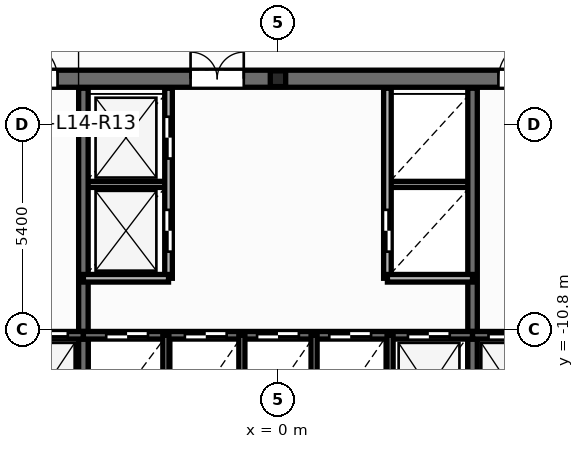
"""IFC4 building model, lengths in metres.
Left out: names, types, materials, properties, quantities, classifications, styles, units other than length and angle.
Written with IfcOpenShell. Run it as: python <this file> out.ifc"""

import sys

from ifc_helpers import new_model, si_unit, direction, frame, frame_2d, origin, origin_2d, place, context, subcontext, project, spatial, rectangle, i_section, extrude, element, fill, save


model = new_model("IFC4")
c1 = context("Model", 3, precision=1e-05, world=origin(), true_north=direction((0.0, 1.0)))
c2 = subcontext(c1, "Body", "Model", "MODEL_VIEW")
j1 = project(units=[si_unit("LENGTHUNIT", "METRE"), si_unit("PLANEANGLEUNIT", "RADIAN")], contexts=[c1])
p1 = place(None, origin())
s1 = spatial("IfcSite", under=j1, at=p1, CompositionType="ELEMENT")
p2 = place(p1, origin())
s2 = spatial("IfcBuilding", under=s1, at=p2, CompositionType="ELEMENT")
p3 = place(p2, frame((0.0, 0.0, 56.7)))
s3 = spatial("IfcBuildingStorey", under=s2, at=p3, CompositionType="ELEMENT", Elevation=56.7)
p4 = place(p3, frame((0.0, -4.2, 0.0), z_axis=(0.0, 0.0, 1.0), x_axis=(1.0, 0.0, 0.0)))
e1 = element("IfcColumn", 1, at=p4, inside=s3, PredefinedType="PILASTER", context=c2, shape_type="SweptSolid", body=[
    extrude(i_section(OverallWidth=0.405, OverallDepth=0.414, WebThickness=0.022, FlangeThickness=0.032, at=origin_2d()), origin(), (0.0, 0.0, 1.0), 3.6),
])
for number, where, z_axis, x_axis in (
    (2, (-5.12, -6.98, 0.0), (0.0, 0.0, 1.0), (1.0, 0.0, 0.0)),
    (3, (2.88, -6.98, 0.0), (0.0, 0.0, 1.0), (1.0, 0.0, 0.0)),
):
    element("IfcWall", number, at=place(p3, frame(where, z_axis=z_axis, x_axis=x_axis)), inside=s3, PredefinedType="PARTITIONING", context=c2, shape_type="SweptSolid", body=[
        extrude(rectangle(XDim=2.24, YDim=0.16, at=frame_2d((1.12, 0.0))), origin(), (0.0, 0.0, 1.0), 3.32),
    ])
p5 = place(p3, frame((-12.65, -4.2, 0.0), z_axis=(0.0, 0.0, 1.0), x_axis=(1.0, 0.0, 0.0)))
e4 = element("IfcWall", 4, at=p5, inside=s3, PredefinedType="SHEAR", context=c2, shape_type="SweptSolid", body=[
    extrude(rectangle(XDim=25.3, YDim=0.45, at=frame_2d((12.65, 0.0))), origin(), (0.0, 0.0, 1.0), 3.6),
])
p6 = place(p5, frame((0.95, 0.0, 0.0)))
e5 = element("IfcOpeningElement", 5, at=p6, cuts=e4, PredefinedType="OPENING", context=c2, shape_type="SweptSolid", body=[
    extrude(rectangle(XDim=0.756, YDim=2.054, at=frame_2d((0.375, 1.027))), frame((0.0, 0.235, 0.0), z_axis=(0.0, -1.0, 0.0), x_axis=(1.0, 0.0, 0.0)), (0.0, 0.0, 1.0), 0.47),
])
p7 = place(p5, frame((2.6, 0.0, 0.0)))
e6 = element("IfcOpeningElement", 6, at=p7, cuts=e4, PredefinedType="OPENING", context=c2, shape_type="SweptSolid", body=[
    extrude(rectangle(XDim=0.756, YDim=2.054, at=frame_2d((0.375, 1.027))), frame((0.0, 0.235, 0.0), z_axis=(0.0, -1.0, 0.0), x_axis=(1.0, 0.0, 0.0)), (0.0, 0.0, 1.0), 0.47),
])
p8 = place(p5, frame((21.85, 0.0, 0.0)))
e7 = element("IfcOpeningElement", 7, at=p8, cuts=e4, PredefinedType="OPENING", context=c2, shape_type="SweptSolid", body=[
    extrude(rectangle(XDim=0.756, YDim=2.054, at=frame_2d((0.375, 1.027))), frame((0.0, 0.235, 0.0), z_axis=(0.0, -1.0, 0.0), x_axis=(1.0, 0.0, 0.0)), (0.0, 0.0, 1.0), 0.47),
])
p9 = place(p5, frame((23.5, 0.0, 0.0)))
e8 = element("IfcOpeningElement", 8, at=p9, cuts=e4, PredefinedType="OPENING", context=c2, shape_type="SweptSolid", body=[
    extrude(rectangle(XDim=0.756, YDim=2.054, at=frame_2d((0.375, 1.027))), frame((0.0, 0.235, 0.0), z_axis=(0.0, -1.0, 0.0), x_axis=(1.0, 0.0, 0.0)), (0.0, 0.0, 1.0), 0.47),
])
p10 = place(p5, frame((5.85, 0.0, 0.0)))
e9 = element("IfcOpeningElement", 9, at=p10, cuts=e4, PredefinedType="OPENING", context=c2, shape_type="SweptSolid", body=[
    extrude(rectangle(XDim=1.006, YDim=2.104, at=frame_2d((0.5, 1.052))), frame((0.0, 0.235, 0.0), z_axis=(0.0, -1.0, 0.0), x_axis=(1.0, 0.0, 0.0)), (0.0, 0.0, 1.0), 0.47),
])
p11 = place(p5, frame((10.35, 0.0, 0.0)))
e10 = element("IfcOpeningElement", 10, at=p11, cuts=e4, PredefinedType="OPENING", context=c2, shape_type="SweptSolid", body=[
    extrude(rectangle(XDim=1.406, YDim=2.154, at=frame_2d((0.7, 1.077))), frame((0.0, 0.235, 0.0), z_axis=(0.0, -1.0, 0.0), x_axis=(1.0, 0.0, 0.0)), (0.0, 0.0, 1.0), 0.47),
])
p12 = place(p5, frame((18.45, 0.0, 0.0)))
e11 = element("IfcOpeningElement", 11, at=p12, cuts=e4, PredefinedType="OPENING", context=c2, shape_type="SweptSolid", body=[
    extrude(rectangle(XDim=1.006, YDim=2.104, at=frame_2d((0.5, 1.052))), frame((0.0, 0.235, 0.0), z_axis=(0.0, -1.0, 0.0), x_axis=(1.0, 0.0, 0.0)), (0.0, 0.0, 1.0), 0.47),
])
for number, where, z_axis, x_axis in (
    (12, (-5.12, -13.85, 0.0), (0.0, 0.0, 1.0), (0.0, 1.0, 0.0)),
    (13, (5.12, -13.85, 0.0), (0.0, 0.0, 1.0), (0.0, 1.0, 0.0)),
):
    element("IfcWall", number, at=place(p3, frame(where, z_axis=z_axis, x_axis=x_axis)), inside=s3, PredefinedType="SHEAR", context=c2, shape_type="SweptSolid", body=[
        extrude(rectangle(XDim=9.4, YDim=0.25, at=frame_2d((4.7, 0.0))), origin(), (0.0, 0.0, 1.0), 3.6),
    ])
p13 = place(p3, frame((-8.48, -10.95, 0.0), z_axis=(0.0, 0.0, 1.0), x_axis=(1.0, 0.0, 0.0)))
e14 = element("IfcWall", 14, at=p13, inside=s3, PredefinedType="SOLIDWALL", context=c2, shape_type="SweptSolid", body=[
    extrude(rectangle(XDim=3.36, YDim=0.2, at=frame_2d((1.68, 0.0))), origin(), (0.0, 0.0, 1.0), 3.6),
])
p14 = place(p13, frame((0.28, 0.0, 0.0)))
e15 = element("IfcOpeningElement", 15, at=p14, cuts=e14, PredefinedType="OPENING", context=c2, shape_type="SweptSolid", body=[
    extrude(rectangle(XDim=0.756, YDim=2.054, at=frame_2d((0.375, 1.027))), frame((0.0, 0.11, 0.0), z_axis=(0.0, -1.0, 0.0), x_axis=(1.0, 0.0, 0.0)), (0.0, 0.0, 1.0), 0.22),
])
p15 = place(p13, frame((1.85, 0.0, 0.0)))
e16 = element("IfcOpeningElement", 16, at=p15, cuts=e14, PredefinedType="OPENING", context=c2, shape_type="SweptSolid", body=[
    extrude(rectangle(XDim=1.106, YDim=2.104, at=frame_2d((0.55, 1.052))), frame((0.0, 0.11, 0.0), z_axis=(0.0, -1.0, 0.0), x_axis=(1.0, 0.0, 0.0)), (0.0, 0.0, 1.0), 0.22),
])
p16 = place(p3, frame((-5.12, -10.95, 0.0), z_axis=(0.0, 0.0, 1.0), x_axis=(1.0, 0.0, 0.0)))
e17 = element("IfcWall", 17, at=p16, inside=s3, PredefinedType="SOLIDWALL", context=c2, shape_type="SweptSolid", body=[
    extrude(rectangle(XDim=10.24, YDim=0.2, at=frame_2d((5.12, 0.0))), origin(), (0.0, 0.0, 1.0), 3.6),
])
p17 = place(p16, frame((0.6, 0.0, 0.0)))
e18 = element("IfcOpeningElement", 18, at=p17, cuts=e17, PredefinedType="OPENING", context=c2, shape_type="SweptSolid", body=[
    extrude(rectangle(XDim=1.106, YDim=2.104, at=frame_2d((0.55, 1.052))), frame((0.0, 0.11, 0.0), z_axis=(0.0, -1.0, 0.0), x_axis=(1.0, 0.0, 0.0)), (0.0, 0.0, 1.0), 0.22),
])
p18 = place(p16, frame((2.67, 0.0, 0.0)))
e19 = element("IfcOpeningElement", 19, at=p18, cuts=e17, PredefinedType="OPENING", context=c2, shape_type="SweptSolid", body=[
    extrude(rectangle(XDim=1.106, YDim=2.104, at=frame_2d((0.55, 1.052))), frame((0.0, 0.11, 0.0), z_axis=(0.0, -1.0, 0.0), x_axis=(1.0, 0.0, 0.0)), (0.0, 0.0, 1.0), 0.22),
])
p19 = place(p16, frame((4.57, 0.0, 0.0)))
e20 = element("IfcOpeningElement", 20, at=p19, cuts=e17, PredefinedType="OPENING", context=c2, shape_type="SweptSolid", body=[
    extrude(rectangle(XDim=1.106, YDim=2.104, at=frame_2d((0.55, 1.052))), frame((0.0, 0.11, 0.0), z_axis=(0.0, -1.0, 0.0), x_axis=(1.0, 0.0, 0.0)), (0.0, 0.0, 1.0), 0.22),
])
p20 = place(p16, frame((6.47, 0.0, 0.0)))
e21 = element("IfcOpeningElement", 21, at=p20, cuts=e17, PredefinedType="OPENING", context=c2, shape_type="SweptSolid", body=[
    extrude(rectangle(XDim=1.106, YDim=2.104, at=frame_2d((0.55, 1.052))), frame((0.0, 0.11, 0.0), z_axis=(0.0, -1.0, 0.0), x_axis=(1.0, 0.0, 0.0)), (0.0, 0.0, 1.0), 0.22),
])
p21 = place(p16, frame((8.54, 0.0, 0.0)))
e22 = element("IfcOpeningElement", 22, at=p21, cuts=e17, PredefinedType="OPENING", context=c2, shape_type="SweptSolid", body=[
    extrude(rectangle(XDim=1.106, YDim=2.104, at=frame_2d((0.55, 1.052))), frame((0.0, 0.11, 0.0), z_axis=(0.0, -1.0, 0.0), x_axis=(1.0, 0.0, 0.0)), (0.0, 0.0, 1.0), 0.22),
])
p22 = place(p3, frame((5.12, -10.95, 0.0), z_axis=(0.0, 0.0, 1.0), x_axis=(1.0, 0.0, 0.0)))
e23 = element("IfcWall", 23, at=p22, inside=s3, PredefinedType="SOLIDWALL", context=c2, shape_type="SweptSolid", body=[
    extrude(rectangle(XDim=3.36, YDim=0.2, at=frame_2d((1.68, 0.0))), origin(), (0.0, 0.0, 1.0), 3.6),
])
p23 = place(p22, frame((0.42, 0.0, 0.0)))
e24 = element("IfcOpeningElement", 24, at=p23, cuts=e23, PredefinedType="OPENING", context=c2, shape_type="SweptSolid", body=[
    extrude(rectangle(XDim=1.106, YDim=2.104, at=frame_2d((0.55, 1.052))), frame((0.0, 0.11, 0.0), z_axis=(0.0, -1.0, 0.0), x_axis=(1.0, 0.0, 0.0)), (0.0, 0.0, 1.0), 0.22),
])
p24 = place(p22, frame((2.3, 0.0, 0.0)))
e25 = element("IfcOpeningElement", 25, at=p24, cuts=e23, PredefinedType="OPENING", context=c2, shape_type="SweptSolid", body=[
    extrude(rectangle(XDim=0.756, YDim=2.054, at=frame_2d((0.375, 1.027))), frame((0.0, 0.11, 0.0), z_axis=(0.0, -1.0, 0.0), x_axis=(1.0, 0.0, 0.0)), (0.0, 0.0, 1.0), 0.22),
])
for number, where, z_axis, x_axis in (
    (26, (-2.95, -13.85, 0.0), (0.0, 0.0, 1.0), (0.0, 1.0, 0.0)),
    (27, (2.95, -13.85, 0.0), (0.0, 0.0, 1.0), (0.0, 1.0, 0.0)),
):
    element("IfcWall", number, at=place(p3, frame(where, z_axis=z_axis, x_axis=x_axis)), inside=s3, PredefinedType="PARTITIONING", context=c2, shape_type="SweptSolid", body=[
        extrude(rectangle(XDim=2.9, YDim=0.16, at=frame_2d((1.45, 0.0))), origin(), (0.0, 0.0, 1.0), 2.345),
    ])
p25 = place(p3, frame((-2.88, -9.45, 0.0), z_axis=(0.0, 0.0, 1.0), x_axis=(0.0, 1.0, 0.0)))
e28 = element("IfcWall", 28, at=p25, inside=s3, PredefinedType="SOLIDWALL", context=c2, shape_type="SweptSolid", body=[
    extrude(rectangle(XDim=5.0, YDim=0.2, at=frame_2d((2.5, 0.0))), origin(), (0.0, 0.0, 1.0), 3.32),
])
p26 = place(p25, frame((0.7, 0.0, 0.0)))
e29 = element("IfcOpeningElement", 29, at=p26, cuts=e28, PredefinedType="OPENING", context=c2, shape_type="SweptSolid", body=[
    extrude(rectangle(XDim=1.106, YDim=2.104, at=frame_2d((0.55, 1.052))), frame((0.0, 0.11, 0.0), z_axis=(0.0, -1.0, 0.0), x_axis=(1.0, 0.0, 0.0)), (0.0, 0.0, 1.0), 0.22),
])
p27 = place(p25, frame((3.15, 0.0, 0.0)))
e30 = element("IfcOpeningElement", 30, at=p27, cuts=e28, PredefinedType="OPENING", context=c2, shape_type="SweptSolid", body=[
    extrude(rectangle(XDim=1.106, YDim=2.104, at=frame_2d((0.55, 1.052))), frame((0.0, 0.11, 0.0), z_axis=(0.0, -1.0, 0.0), x_axis=(1.0, 0.0, 0.0)), (0.0, 0.0, 1.0), 0.22),
])
p28 = place(p3, frame((-5.12, -9.45, 0.0), z_axis=(0.0, 0.0, 1.0), x_axis=(1.0, 0.0, 0.0)))
e31 = element("IfcWall", 31, at=p28, inside=s3, PredefinedType="SOLIDWALL", context=c2, shape_type="SweptSolid", body=[
    extrude(rectangle(XDim=2.24, YDim=0.2, at=frame_2d((1.12, 0.0))), origin(), (0.0, 0.0, 1.0), 3.32),
])
p29 = place(p3, frame((2.88, -9.45, 0.0), z_axis=(0.0, 0.0, 1.0), x_axis=(0.0, 1.0, 0.0)))
e32 = element("IfcWall", 32, at=p29, inside=s3, PredefinedType="SOLIDWALL", context=c2, shape_type="SweptSolid", body=[
    extrude(rectangle(XDim=5.0, YDim=0.2, at=frame_2d((2.5, 0.0))), origin(), (0.0, 0.0, 1.0), 3.32),
])
p30 = place(p29, frame((0.7, 0.0, 0.0)))
e33 = element("IfcOpeningElement", 33, at=p30, cuts=e32, PredefinedType="OPENING", context=c2, shape_type="SweptSolid", body=[
    extrude(rectangle(XDim=1.106, YDim=2.104, at=frame_2d((0.55, 1.052))), frame((0.0, 0.11, 0.0), z_axis=(0.0, -1.0, 0.0), x_axis=(1.0, 0.0, 0.0)), (0.0, 0.0, 1.0), 0.22),
])
p31 = place(p3, frame((2.88, -9.45, 0.0), z_axis=(0.0, 0.0, 1.0), x_axis=(1.0, 0.0, 0.0)))
e34 = element("IfcWall", 34, at=p31, inside=s3, PredefinedType="SOLIDWALL", context=c2, shape_type="SweptSolid", body=[
    extrude(rectangle(XDim=2.24, YDim=0.2, at=frame_2d((1.12, 0.0))), origin(), (0.0, 0.0, 1.0), 3.32),
])
for number, where, z_axis, x_axis in (
    (35, (-0.95, -13.85, 0.0), (0.0, 0.0, 1.0), (0.0, 1.0, 0.0)),
    (36, (0.95, -13.85, 0.0), (0.0, 0.0, 1.0), (0.0, 1.0, 0.0)),
):
    element("IfcWall", number, at=place(p3, frame(where, z_axis=z_axis, x_axis=x_axis)), inside=s3, PredefinedType="PARTITIONING", context=c2, shape_type="SweptSolid", body=[
        extrude(rectangle(XDim=2.9, YDim=0.16, at=frame_2d((1.45, 0.0))), origin(), (0.0, 0.0, 1.0), 2.345),
    ])
p32 = place(p26, origin())
e37 = element("IfcDoor", 37, at=p32, inside=s3, OperationType="DOUBLE_DOOR_SLIDING", PredefinedType="DOOR", context=c2, shape_type="SweptSolid", body=[
    extrude(rectangle(XDim=1.1, YDim=2.1, at=frame_2d((0.55, 1.05))), frame((0.0, 0.025, 0.0), z_axis=(0.0, -1.0, 0.0), x_axis=(1.0, 0.0, 0.0)), (0.0, 0.0, 1.0), 0.05),
])
fill(e29, e37)
p33 = place(p27, origin())
e38 = element("IfcDoor", 38, at=p33, inside=s3, OperationType="DOUBLE_DOOR_SLIDING", PredefinedType="DOOR", context=c2, shape_type="SweptSolid", body=[
    extrude(rectangle(XDim=1.1, YDim=2.1, at=frame_2d((0.55, 1.05))), frame((0.0, 0.025, 0.0), z_axis=(0.0, -1.0, 0.0), x_axis=(1.0, 0.0, 0.0)), (0.0, 0.0, 1.0), 0.05),
])
fill(e30, e38)
p34 = place(p30, origin())
e39 = element("IfcDoor", 39, at=p34, inside=s3, OperationType="DOUBLE_DOOR_SLIDING", PredefinedType="DOOR", context=c2, shape_type="SweptSolid", body=[
    extrude(rectangle(XDim=1.1, YDim=2.1, at=frame_2d((0.55, 1.05))), frame((0.0, 0.025, 0.0), z_axis=(0.0, -1.0, 0.0), x_axis=(1.0, 0.0, 0.0)), (0.0, 0.0, 1.0), 0.05),
])
fill(e33, e39)
p35 = place(p15, origin())
e40 = element("IfcDoor", 40, at=p35, inside=s3, OperationType="DOUBLE_DOOR_SLIDING", PredefinedType="DOOR", context=c2, shape_type="SweptSolid", body=[
    extrude(rectangle(XDim=1.1, YDim=2.1, at=frame_2d((0.55, 1.05))), frame((0.0, 0.025, 0.0), z_axis=(0.0, -1.0, 0.0), x_axis=(1.0, 0.0, 0.0)), (0.0, 0.0, 1.0), 0.05),
])
fill(e16, e40)
p36 = place(p23, origin())
e41 = element("IfcDoor", 41, at=p36, inside=s3, OperationType="DOUBLE_DOOR_SLIDING", PredefinedType="DOOR", context=c2, shape_type="SweptSolid", body=[
    extrude(rectangle(XDim=1.1, YDim=2.1, at=frame_2d((0.55, 1.05))), frame((0.0, 0.025, 0.0), z_axis=(0.0, -1.0, 0.0), x_axis=(1.0, 0.0, 0.0)), (0.0, 0.0, 1.0), 0.05),
])
fill(e24, e41)
p37 = place(p17, origin())
e42 = element("IfcDoor", 42, at=p37, inside=s3, OperationType="DOUBLE_DOOR_SLIDING", PredefinedType="DOOR", context=c2, shape_type="SweptSolid", body=[
    extrude(rectangle(XDim=1.1, YDim=2.1, at=frame_2d((0.55, 1.05))), frame((0.0, 0.025, 0.0), z_axis=(0.0, -1.0, 0.0), x_axis=(1.0, 0.0, 0.0)), (0.0, 0.0, 1.0), 0.05),
])
fill(e18, e42)
p38 = place(p18, origin())
e43 = element("IfcDoor", 43, at=p38, inside=s3, OperationType="DOUBLE_DOOR_SLIDING", PredefinedType="DOOR", context=c2, shape_type="SweptSolid", body=[
    extrude(rectangle(XDim=1.1, YDim=2.1, at=frame_2d((0.55, 1.05))), frame((0.0, 0.025, 0.0), z_axis=(0.0, -1.0, 0.0), x_axis=(1.0, 0.0, 0.0)), (0.0, 0.0, 1.0), 0.05),
])
fill(e19, e43)
p39 = place(p19, origin())
e44 = element("IfcDoor", 44, at=p39, inside=s3, OperationType="DOUBLE_DOOR_SLIDING", PredefinedType="DOOR", context=c2, shape_type="SweptSolid", body=[
    extrude(rectangle(XDim=1.1, YDim=2.1, at=frame_2d((0.55, 1.05))), frame((0.0, 0.025, 0.0), z_axis=(0.0, -1.0, 0.0), x_axis=(1.0, 0.0, 0.0)), (0.0, 0.0, 1.0), 0.05),
])
fill(e20, e44)
p40 = place(p20, origin())
e45 = element("IfcDoor", 45, at=p40, inside=s3, OperationType="DOUBLE_DOOR_SLIDING", PredefinedType="DOOR", context=c2, shape_type="SweptSolid", body=[
    extrude(rectangle(XDim=1.1, YDim=2.1, at=frame_2d((0.55, 1.05))), frame((0.0, 0.025, 0.0), z_axis=(0.0, -1.0, 0.0), x_axis=(1.0, 0.0, 0.0)), (0.0, 0.0, 1.0), 0.05),
])
fill(e21, e45)
p41 = place(p21, origin())
e46 = element("IfcDoor", 46, at=p41, inside=s3, OperationType="DOUBLE_DOOR_SLIDING", PredefinedType="DOOR", context=c2, shape_type="SweptSolid", body=[
    extrude(rectangle(XDim=1.1, YDim=2.1, at=frame_2d((0.55, 1.05))), frame((0.0, 0.025, 0.0), z_axis=(0.0, -1.0, 0.0), x_axis=(1.0, 0.0, 0.0)), (0.0, 0.0, 1.0), 0.05),
])
fill(e22, e46)
p42 = place(p10, origin())
e47 = element("IfcDoor", 47, at=p42, inside=s3, OperationType="SINGLE_SWING_LEFT", PredefinedType="DOOR", context=c2, shape_type="SweptSolid", body=[
    extrude(rectangle(XDim=1.0, YDim=2.1, at=frame_2d((0.5, 1.05))), frame((0.0, 0.025, 0.0), z_axis=(0.0, -1.0, 0.0), x_axis=(1.0, 0.0, 0.0)), (0.0, 0.0, 1.0), 0.05),
])
fill(e9, e47)
p43 = place(p11, origin())
e48 = element("IfcDoor", 48, at=p43, inside=s3, OperationType="DOUBLE_DOOR_SINGLE_SWING", PredefinedType="DOOR", context=c2, shape_type="SweptSolid", body=[
    extrude(rectangle(XDim=1.4, YDim=2.15, at=frame_2d((0.7, 1.075))), frame((0.0, 0.025, 0.0), z_axis=(0.0, -1.0, 0.0), x_axis=(1.0, 0.0, 0.0)), (0.0, 0.0, 1.0), 0.05),
])
fill(e10, e48)
p44 = place(p12, origin())
e49 = element("IfcDoor", 49, at=p44, inside=s3, OperationType="SINGLE_SWING_RIGHT", PredefinedType="DOOR", context=c2, shape_type="SweptSolid", body=[
    extrude(rectangle(XDim=1.0, YDim=2.1, at=frame_2d((0.5, 1.05))), frame((0.0, 0.025, 0.0), z_axis=(0.0, -1.0, 0.0), x_axis=(1.0, 0.0, 0.0)), (0.0, 0.0, 1.0), 0.05),
])
fill(e11, e49)
save(model, sys.argv[1])
